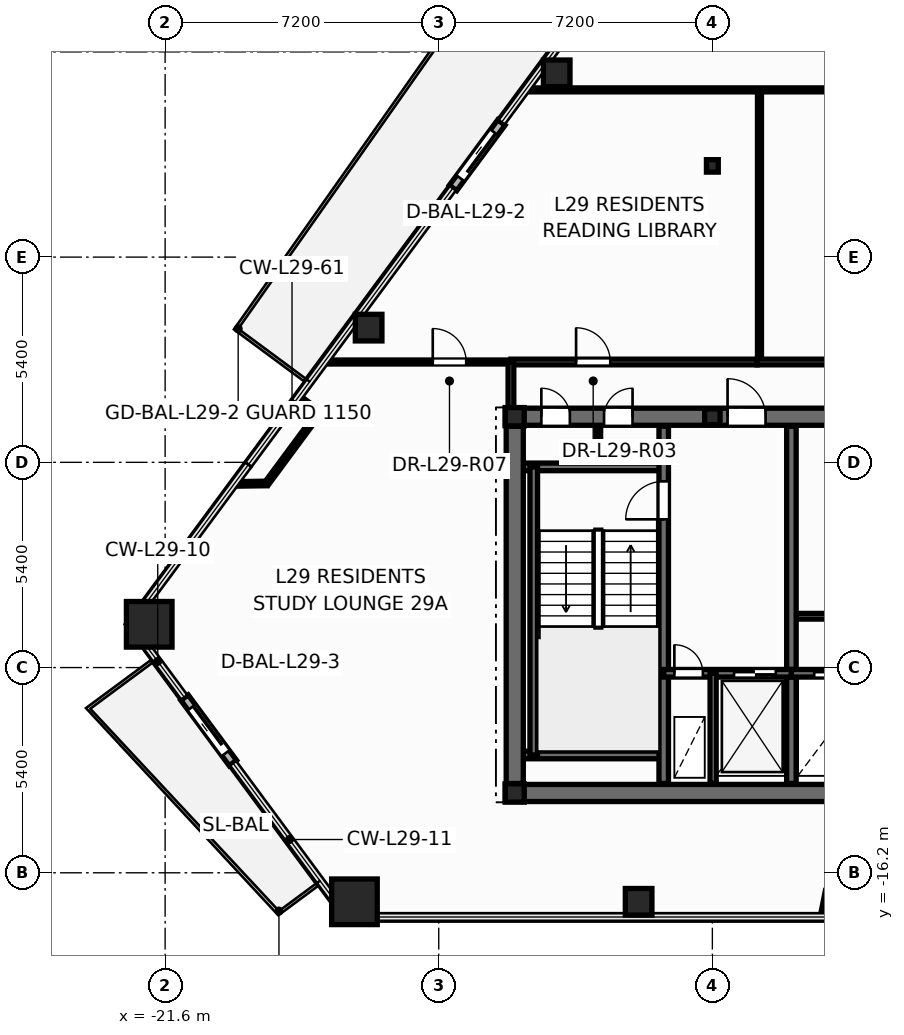
"""IFC4 building model, lengths in metres.
Left out: names, types, materials, properties, quantities, classifications, styles, units other than length and angle.
Written with IfcOpenShell. Run it as: python <this file> out.ifc"""

import sys

from ifc_helpers import new_model, si_unit, direction, frame, frame_2d, origin, origin_2d, place, context, subcontext, project, spatial, rectangle, hollow_rectangle, hollow_circle, i_section, extrude, element, fill, save


model = new_model("IFC4")
c1 = context("Model", 3, precision=1e-05, world=origin(), true_north=direction((0.0, 1.0)))
c2 = subcontext(c1, "Body", "Model", "MODEL_VIEW")
j1 = project(units=[si_unit("LENGTHUNIT", "METRE"), si_unit("PLANEANGLEUNIT", "RADIAN")], contexts=[c1])
p1 = place(None, origin())
s1 = spatial("IfcSite", under=j1, at=p1, CompositionType="ELEMENT")
p2 = place(p1, origin())
s2 = spatial("IfcBuilding", under=s1, at=p2, CompositionType="ELEMENT")
p3 = place(p2, frame((0.0, 0.0, 114.0)))
s3 = spatial("IfcBuildingStorey", under=s2, at=p3, CompositionType="ELEMENT", Elevation=114.0)
for number, where, z_axis, x_axis in (
    (1, (-22.019, -9.662, 0.0), (0.0, 0.0, 1.0), (1.0, 0.0, 0.0)),
    (2, (-16.618, -16.963, 0.0), (0.0, 0.0, 1.0), (1.0, 0.0, 0.0)),
):
    element("IfcColumn", number, at=place(p3, frame(where, z_axis=z_axis, x_axis=x_axis)), inside=s3, PredefinedType="COLUMN", context=c2, shape_type="SweptSolid", body=[
        extrude(hollow_rectangle(XDim=1.2, YDim=1.2, WallThickness=0.055, at=origin_2d()), origin(), (0.0, 0.0, 1.0), 3.6),
    ])
for number, where, z_axis, x_axis in (
    (3, (-9.14, -16.963, 0.0), (0.0, 0.0, 1.0), (1.0, 0.0, 0.0)),
    (4, (-11.296, 4.836, 0.0), (0.0, 0.0, 1.0), (1.0, 0.0, 0.0)),
    (5, (-16.245, -1.856, 0.0), (0.0, 0.0, 1.0), (1.0, 0.0, 0.0)),
):
    element("IfcColumn", number, at=place(p3, frame(where, z_axis=z_axis, x_axis=x_axis)), inside=s3, PredefinedType="COLUMN", context=c2, shape_type="SweptSolid", body=[
        extrude(hollow_circle(Radius=0.35, WallThickness=0.03, at=origin_2d()), origin(), (0.0, 0.0, 1.0), 3.6),
    ])
for number, where, z_axis, x_axis in (
    (6, (-12.4, -14.1, 0.0), (0.0, 0.0, 1.0), (1.0, 0.0, 0.0)),
    (7, (-12.4, -4.2, 0.0), (0.0, 0.0, 1.0), (1.0, 0.0, 0.0)),
):
    element("IfcColumn", number, at=place(p3, frame(where, z_axis=z_axis, x_axis=x_axis)), inside=s3, PredefinedType="COLUMN", context=c2, shape_type="SweptSolid", body=[
        extrude(i_section(OverallWidth=0.5, OverallDepth=0.482, WebThickness=0.04, FlangeThickness=0.045, at=origin_2d()), origin(), (0.0, 0.0, 1.0), 3.6),
    ])
p4 = place(p3, frame((-7.2, -4.2, 0.0), z_axis=(0.0, 0.0, 1.0), x_axis=(1.0, 0.0, 0.0)))
e8 = element("IfcColumn", 8, at=p4, inside=s3, PredefinedType="PILASTER", context=c2, shape_type="SweptSolid", body=[
    extrude(i_section(OverallWidth=0.405, OverallDepth=0.414, WebThickness=0.022, FlangeThickness=0.032, at=origin_2d()), origin(), (0.0, 0.0, 1.0), 3.6),
])
p5 = place(p3, frame((-7.2, 2.4, 0.0), z_axis=(0.0, 0.0, 1.0), x_axis=(1.0, 0.0, 0.0)))
e9 = element("IfcColumn", 9, at=p5, inside=s3, PredefinedType="COLUMN", context=c2, shape_type="SweptSolid", body=[
    extrude(i_section(OverallWidth=0.311, OverallDepth=0.327, WebThickness=0.016, FlangeThickness=0.025, at=origin_2d()), origin(), (0.0, 0.0, 1.0), 3.6),
])
p6 = place(p3, frame((-12.751, 3.541, -0.015), z_axis=(0.0, 0.0, 1.0), x_axis=(-0.594638042479, -0.80399353134, 0.0)))
e10 = element("IfcWall", 10, at=p6, inside=s3, PredefinedType="STANDARD", context=c2, shape_type="SweptSolid", body=[
    extrude(rectangle(XDim=2.14, YDim=0.24, at=frame_2d((1.07, 0.0))), origin(), (0.0, 0.0, 1.0), 2.777),
])
p7 = place(p6, frame((0.32, 0.0, 0.015)))
e11 = element("IfcOpeningElement", 11, at=p7, cuts=e10, PredefinedType="OPENING", context=c2, shape_type="SweptSolid", body=[
    extrude(rectangle(XDim=1.506, YDim=2.204, at=frame_2d((0.75, 1.102))), frame((0.0, 0.13, 0.0), z_axis=(0.0, -1.0, 0.0), x_axis=(1.0, 0.0, 0.0)), (0.0, 0.0, 1.0), 0.26),
])
p8 = place(p3, frame((-21.09, -11.59, -0.015), z_axis=(0.0, 0.0, 1.0), x_axis=(0.594638042479, -0.80399353134, 0.0)))
e12 = element("IfcWall", 12, at=p8, inside=s3, PredefinedType="STANDARD", context=c2, shape_type="SweptSolid", body=[
    extrude(rectangle(XDim=2.14, YDim=0.24, at=frame_2d((1.07, 0.0))), origin(), (0.0, 0.0, 1.0), 2.777),
])
p9 = place(p8, frame((0.32, 0.0, 0.015)))
e13 = element("IfcOpeningElement", 13, at=p9, cuts=e12, PredefinedType="OPENING", context=c2, shape_type="SweptSolid", body=[
    extrude(rectangle(XDim=1.506, YDim=2.204, at=frame_2d((0.75, 1.102))), frame((0.0, 0.13, 0.0), z_axis=(0.0, -1.0, 0.0), x_axis=(1.0, 0.0, 0.0)), (0.0, 0.0, 1.0), 0.26),
])
p10 = place(p3, frame((-5.12, -9.45, 0.0), z_axis=(0.0, 0.0, 1.0), x_axis=(1.0, 0.0, 0.0)))
e14 = element("IfcWall", 14, at=p10, inside=s3, PredefinedType="PARTITIONING", context=c2, shape_type="SweptSolid", body=[
    extrude(rectangle(XDim=3.06, YDim=0.15, at=frame_2d((1.53, 0.0))), origin(), (0.0, 0.0, 1.0), 3.32),
])
p11 = place(p3, frame((-10.2, -5.52, 0.0), z_axis=(0.0, 0.0, 1.0), x_axis=(0.0, 1.0, 0.0)))
e15 = element("IfcWall", 15, at=p11, inside=s3, PredefinedType="PARTITIONING", context=c2, shape_type="SweptSolid", body=[
    extrude(rectangle(XDim=1.12, YDim=0.12, at=frame_2d((0.56, 0.0))), origin(), (0.0, 0.0, 1.0), 3.32),
])
p12 = place(p3, frame((-12.65, -14.1, 0.0), z_axis=(0.0, 0.0, 1.0), x_axis=(1.0, 0.0, 0.0)))
e16 = element("IfcWall", 16, at=p12, inside=s3, PredefinedType="SHEAR", context=c2, shape_type="SweptSolid", body=[
    extrude(rectangle(XDim=25.3, YDim=0.45, at=frame_2d((12.65, 0.0))), origin(), (0.0, 0.0, 1.0), 3.6),
])
p13 = place(p3, frame((-12.65, -4.2, 0.0), z_axis=(0.0, 0.0, 1.0), x_axis=(1.0, 0.0, 0.0)))
e17 = element("IfcWall", 17, at=p13, inside=s3, PredefinedType="SHEAR", context=c2, shape_type="SweptSolid", body=[
    extrude(rectangle(XDim=25.3, YDim=0.45, at=frame_2d((12.65, 0.0))), origin(), (0.0, 0.0, 1.0), 3.6),
])
p14 = place(p13, frame((0.95, 0.0, 0.0)))
e18 = element("IfcOpeningElement", 18, at=p14, cuts=e17, PredefinedType="OPENING", context=c2, shape_type="SweptSolid", body=[
    extrude(rectangle(XDim=0.756, YDim=2.054, at=frame_2d((0.375, 1.027))), frame((0.0, 0.235, 0.0), z_axis=(0.0, -1.0, 0.0), x_axis=(1.0, 0.0, 0.0)), (0.0, 0.0, 1.0), 0.47),
])
p15 = place(p13, frame((2.6, 0.0, 0.0)))
e19 = element("IfcOpeningElement", 19, at=p15, cuts=e17, PredefinedType="OPENING", context=c2, shape_type="SweptSolid", body=[
    extrude(rectangle(XDim=0.756, YDim=2.054, at=frame_2d((0.375, 1.027))), frame((0.0, 0.235, 0.0), z_axis=(0.0, -1.0, 0.0), x_axis=(1.0, 0.0, 0.0)), (0.0, 0.0, 1.0), 0.47),
])
p16 = place(p13, frame((21.85, 0.0, 0.0)))
e20 = element("IfcOpeningElement", 20, at=p16, cuts=e17, PredefinedType="OPENING", context=c2, shape_type="SweptSolid", body=[
    extrude(rectangle(XDim=0.756, YDim=2.054, at=frame_2d((0.375, 1.027))), frame((0.0, 0.235, 0.0), z_axis=(0.0, -1.0, 0.0), x_axis=(1.0, 0.0, 0.0)), (0.0, 0.0, 1.0), 0.47),
])
p17 = place(p13, frame((23.5, 0.0, 0.0)))
e21 = element("IfcOpeningElement", 21, at=p17, cuts=e17, PredefinedType="OPENING", context=c2, shape_type="SweptSolid", body=[
    extrude(rectangle(XDim=0.756, YDim=2.054, at=frame_2d((0.375, 1.027))), frame((0.0, 0.235, 0.0), z_axis=(0.0, -1.0, 0.0), x_axis=(1.0, 0.0, 0.0)), (0.0, 0.0, 1.0), 0.47),
])
p18 = place(p13, frame((5.85, 0.0, 0.0)))
e22 = element("IfcOpeningElement", 22, at=p18, cuts=e17, PredefinedType="OPENING", context=c2, shape_type="SweptSolid", body=[
    extrude(rectangle(XDim=1.006, YDim=2.104, at=frame_2d((0.5, 1.052))), frame((0.0, 0.235, 0.0), z_axis=(0.0, -1.0, 0.0), x_axis=(1.0, 0.0, 0.0)), (0.0, 0.0, 1.0), 0.47),
])
p19 = place(p13, frame((10.35, 0.0, 0.0)))
e23 = element("IfcOpeningElement", 23, at=p19, cuts=e17, PredefinedType="OPENING", context=c2, shape_type="SweptSolid", body=[
    extrude(rectangle(XDim=1.406, YDim=2.154, at=frame_2d((0.7, 1.077))), frame((0.0, 0.235, 0.0), z_axis=(0.0, -1.0, 0.0), x_axis=(1.0, 0.0, 0.0)), (0.0, 0.0, 1.0), 0.47),
])
p20 = place(p13, frame((18.45, 0.0, 0.0)))
e24 = element("IfcOpeningElement", 24, at=p20, cuts=e17, PredefinedType="OPENING", context=c2, shape_type="SweptSolid", body=[
    extrude(rectangle(XDim=1.006, YDim=2.104, at=frame_2d((0.5, 1.052))), frame((0.0, 0.235, 0.0), z_axis=(0.0, -1.0, 0.0), x_axis=(1.0, 0.0, 0.0)), (0.0, 0.0, 1.0), 0.47),
])
for number, where, z_axis, x_axis in (
    (25, (-12.35, -5.52, 0.0), (0.0, 0.0, 1.0), (1.0, 0.0, 0.0)),
    (26, (-12.35, -13.1, 0.0), (0.0, 0.0, 1.0), (1.0, 0.0, 0.0)),
):
    element("IfcWall", number, at=place(p3, frame(where, z_axis=z_axis, x_axis=x_axis)), inside=s3, PredefinedType="SOLIDWALL", context=c2, shape_type="SweptSolid", body=[
        extrude(rectangle(XDim=3.87, YDim=0.2, at=frame_2d((1.935, 0.0))), origin(), (0.0, 0.0, 1.0), 3.6),
    ])
p21 = place(p3, frame((-11.9, -13.1, 0.0), z_axis=(0.0, 0.0, 1.0), x_axis=(0.0, 1.0, 0.0)))
e27 = element("IfcWall", 27, at=p21, inside=s3, PredefinedType="SOLIDWALL", context=c2, shape_type="SweptSolid", body=[
    extrude(rectangle(XDim=7.58, YDim=0.2, at=frame_2d((3.79, 0.0))), origin(), (0.0, 0.0, 1.0), 3.6),
])
p22 = place(p3, frame((-8.48, -13.85, 0.0), z_axis=(0.0, 0.0, 1.0), x_axis=(0.0, 1.0, 0.0)))
e28 = element("IfcWall", 28, at=p22, inside=s3, PredefinedType="SHEAR", context=c2, shape_type="SweptSolid", body=[
    extrude(rectangle(XDim=9.4, YDim=0.25, at=frame_2d((4.7, 0.0))), origin(), (0.0, 0.0, 1.0), 3.6),
])
p23 = place(p22, frame((6.95, 0.0, 0.0)))
e29 = element("IfcOpeningElement", 29, at=p23, cuts=e28, PredefinedType="OPENING", context=c2, shape_type="SweptSolid", body=[
    extrude(rectangle(XDim=1.006, YDim=2.104, at=frame_2d((0.5, 1.052))), frame((0.0, 0.135, 0.0), z_axis=(0.0, -1.0, 0.0), x_axis=(1.0, 0.0, 0.0)), (0.0, 0.0, 1.0), 0.27),
])
p24 = place(p3, frame((-5.12, -13.85, 0.0), z_axis=(0.0, 0.0, 1.0), x_axis=(0.0, 1.0, 0.0)))
e30 = element("IfcWall", 30, at=p24, inside=s3, PredefinedType="SHEAR", context=c2, shape_type="SweptSolid", body=[
    extrude(rectangle(XDim=9.4, YDim=0.25, at=frame_2d((4.7, 0.0))), origin(), (0.0, 0.0, 1.0), 3.6),
])
p25 = place(p3, frame((-8.48, -10.95, 0.0), z_axis=(0.0, 0.0, 1.0), x_axis=(1.0, 0.0, 0.0)))
e31 = element("IfcWall", 31, at=p25, inside=s3, PredefinedType="SOLIDWALL", context=c2, shape_type="SweptSolid", body=[
    extrude(rectangle(XDim=3.36, YDim=0.2, at=frame_2d((1.68, 0.0))), origin(), (0.0, 0.0, 1.0), 3.6),
])
p26 = place(p25, frame((0.28, 0.0, 0.0)))
e32 = element("IfcOpeningElement", 32, at=p26, cuts=e31, PredefinedType="OPENING", context=c2, shape_type="SweptSolid", body=[
    extrude(rectangle(XDim=0.756, YDim=2.054, at=frame_2d((0.375, 1.027))), frame((0.0, 0.11, 0.0), z_axis=(0.0, -1.0, 0.0), x_axis=(1.0, 0.0, 0.0)), (0.0, 0.0, 1.0), 0.22),
])
p27 = place(p25, frame((1.85, 0.0, 0.0)))
e33 = element("IfcOpeningElement", 33, at=p27, cuts=e31, PredefinedType="OPENING", context=c2, shape_type="SweptSolid", body=[
    extrude(rectangle(XDim=1.106, YDim=2.104, at=frame_2d((0.55, 1.052))), frame((0.0, 0.11, 0.0), z_axis=(0.0, -1.0, 0.0), x_axis=(1.0, 0.0, 0.0)), (0.0, 0.0, 1.0), 0.22),
])
p28 = place(p3, frame((-5.12, -10.95, 0.0), z_axis=(0.0, 0.0, 1.0), x_axis=(1.0, 0.0, 0.0)))
e34 = element("IfcWall", 34, at=p28, inside=s3, PredefinedType="SOLIDWALL", context=c2, shape_type="SweptSolid", body=[
    extrude(rectangle(XDim=10.24, YDim=0.2, at=frame_2d((5.12, 0.0))), origin(), (0.0, 0.0, 1.0), 3.6),
])
p29 = place(p28, frame((0.6, 0.0, 0.0)))
e35 = element("IfcOpeningElement", 35, at=p29, cuts=e34, PredefinedType="OPENING", context=c2, shape_type="SweptSolid", body=[
    extrude(rectangle(XDim=1.106, YDim=2.104, at=frame_2d((0.55, 1.052))), frame((0.0, 0.11, 0.0), z_axis=(0.0, -1.0, 0.0), x_axis=(1.0, 0.0, 0.0)), (0.0, 0.0, 1.0), 0.22),
])
p30 = place(p28, frame((2.67, 0.0, 0.0)))
e36 = element("IfcOpeningElement", 36, at=p30, cuts=e34, PredefinedType="OPENING", context=c2, shape_type="SweptSolid", body=[
    extrude(rectangle(XDim=1.106, YDim=2.104, at=frame_2d((0.55, 1.052))), frame((0.0, 0.11, 0.0), z_axis=(0.0, -1.0, 0.0), x_axis=(1.0, 0.0, 0.0)), (0.0, 0.0, 1.0), 0.22),
])
p31 = place(p28, frame((4.57, 0.0, 0.0)))
e37 = element("IfcOpeningElement", 37, at=p31, cuts=e34, PredefinedType="OPENING", context=c2, shape_type="SweptSolid", body=[
    extrude(rectangle(XDim=1.106, YDim=2.104, at=frame_2d((0.55, 1.052))), frame((0.0, 0.11, 0.0), z_axis=(0.0, -1.0, 0.0), x_axis=(1.0, 0.0, 0.0)), (0.0, 0.0, 1.0), 0.22),
])
p32 = place(p28, frame((6.47, 0.0, 0.0)))
e38 = element("IfcOpeningElement", 38, at=p32, cuts=e34, PredefinedType="OPENING", context=c2, shape_type="SweptSolid", body=[
    extrude(rectangle(XDim=1.106, YDim=2.104, at=frame_2d((0.55, 1.052))), frame((0.0, 0.11, 0.0), z_axis=(0.0, -1.0, 0.0), x_axis=(1.0, 0.0, 0.0)), (0.0, 0.0, 1.0), 0.22),
])
p33 = place(p28, frame((8.54, 0.0, 0.0)))
e39 = element("IfcOpeningElement", 39, at=p33, cuts=e34, PredefinedType="OPENING", context=c2, shape_type="SweptSolid", body=[
    extrude(rectangle(XDim=1.106, YDim=2.104, at=frame_2d((0.55, 1.052))), frame((0.0, 0.11, 0.0), z_axis=(0.0, -1.0, 0.0), x_axis=(1.0, 0.0, 0.0)), (0.0, 0.0, 1.0), 0.22),
])
p34 = place(p3, frame((-7.18, -13.85, 0.0), z_axis=(0.0, 0.0, 1.0), x_axis=(0.0, 1.0, 0.0)))
e40 = element("IfcWall", 40, at=p34, inside=s3, PredefinedType="PARTITIONING", context=c2, shape_type="SweptSolid", body=[
    extrude(rectangle(XDim=2.9, YDim=0.16, at=frame_2d((1.45, 0.0))), origin(), (0.0, 0.0, 1.0), 2.345),
])
p35 = place(p3, frame((-12.4, -13.85, 0.0), z_axis=(0.0, 0.0, 1.0), x_axis=(0.0, 1.0, 0.0)))
e41 = element("IfcWall", 41, at=p35, inside=s3, PredefinedType="SHEAR", context=c2, shape_type="SweptSolid", body=[
    extrude(rectangle(XDim=9.4, YDim=0.45, at=frame_2d((4.7, 0.0))), origin(), (0.0, 0.0, 1.0), 3.6),
])
p36 = place(p3, frame((-5.96, -2.76, 0.0), z_axis=(0.0, 0.0, 1.0), x_axis=(0.0, 1.0, 0.0)))
e42 = element("IfcWall", 42, at=p36, inside=s3, PredefinedType="PARTITIONING", context=c2, shape_type="SweptSolid", body=[
    extrude(rectangle(XDim=7.16, YDim=0.105, at=frame_2d((3.58, 0.0))), origin(), (0.0, 0.0, 1.0), 2.295),
])
p37 = place(p3, frame((-6.02, -2.76, 0.0), z_axis=(0.0, 0.0, 1.0), x_axis=(1.0, 0.0, 0.0)))
e43 = element("IfcWall", 43, at=p37, inside=s3, PredefinedType="PARTITIONING", context=c2, shape_type="SweptSolid", body=[
    extrude(rectangle(XDim=6.66, YDim=0.15, at=frame_2d((3.33, 0.0))), origin(), (0.0, 0.0, 1.0), 2.295),
])
p38 = place(p3, frame((-12.116, 4.4, 0.0), z_axis=(0.0, 0.0, 1.0), x_axis=(1.0, 0.0, 0.0)))
e44 = element("IfcWall", 44, at=p38, inside=s3, PredefinedType="PARTITIONING", context=c2, shape_type="SweptSolid", body=[
    extrude(rectangle(XDim=12.756, YDim=0.105, at=frame_2d((6.378, 0.0))), origin(), (0.0, 0.0, 1.0), 2.295),
])
p39 = place(p3, frame((-12.5, -2.76, 0.0), z_axis=(0.0, 0.0, 1.0), x_axis=(1.0, 0.0, 0.0)))
e45 = element("IfcWall", 45, at=p39, inside=s3, PredefinedType="PARTITIONING", context=c2, shape_type="SweptSolid", body=[
    extrude(rectangle(XDim=6.478, YDim=0.15, at=frame_2d((3.239, 0.0))), origin(), (0.0, 0.0, 1.0), 2.295),
])
p40 = place(p39, frame((1.714, 0.0, 0.0)))
e46 = element("IfcOpeningElement", 46, at=p40, cuts=e45, PredefinedType="OPENING", context=c2, shape_type="SweptSolid", body=[
    extrude(rectangle(XDim=0.906, YDim=2.104, at=frame_2d((0.45, 1.052))), frame((0.0, 0.085, 0.0), z_axis=(0.0, -1.0, 0.0), x_axis=(1.0, 0.0, 0.0)), (0.0, 0.0, 1.0), 0.17),
])
p41 = place(p3, frame((-17.411, -2.76, 0.0), z_axis=(0.0, 0.0, 1.0), x_axis=(1.0, 0.0, 0.0)))
e47 = element("IfcWall", 47, at=p41, inside=s3, PredefinedType="PARTITIONING", context=c2, shape_type="SweptSolid", body=[
    extrude(rectangle(XDim=4.971, YDim=0.105, at=frame_2d((2.486, 0.0))), origin(), (0.0, 0.0, 1.0), 2.762),
])
p42 = place(p41, frame((2.854, 0.0, 0.0)))
e48 = element("IfcOpeningElement", 48, at=p42, cuts=e47, PredefinedType="OPENING", context=c2, shape_type="SweptSolid", body=[
    extrude(rectangle(XDim=0.886, YDim=2.104, at=frame_2d((0.44, 1.052))), frame((0.0, 0.062, 0.0), z_axis=(0.0, -1.0, 0.0), x_axis=(1.0, 0.0, 0.0)), (0.0, 0.0, 1.0), 0.125),
])
p43 = place(p3, frame((-17.548, -4.089, 0.0), z_axis=(0.0, 0.0, 1.0), x_axis=(-0.594707185977, -0.803942387829, 0.0)))
e49 = element("IfcWall", 49, at=p43, inside=s3, PredefinedType="PARTITIONING", context=c2, shape_type="SweptSolid", body=[
    extrude(rectangle(XDim=2.323, YDim=0.12, at=frame_2d((1.162, 0.0))), origin(), (0.0, 0.0, 1.0), 3.32),
])
p44 = place(p3, frame((-12.5, -4.24, 0.0), z_axis=(0.0, 0.0, 1.0), x_axis=(0.0, 1.0, 0.0)))
e50 = element("IfcWall", 50, at=p44, inside=s3, PredefinedType="PARTITIONING", context=c2, shape_type="SweptSolid", body=[
    extrude(rectangle(XDim=1.48, YDim=0.15, at=frame_2d((0.74, 0.0))), origin(), (0.0, 0.0, 1.0), 2.295),
])
p45 = place(p3, frame((-18.93, -5.956, 0.0), z_axis=(0.0, 0.0, 1.0), x_axis=(-0.999903115379, -0.013919764947, 0.0)))
e51 = element("IfcWall", 51, at=p45, inside=s3, PredefinedType="PARTITIONING", context=c2, shape_type="SweptSolid", body=[
    extrude(rectangle(XDim=0.842, YDim=0.12, at=frame_2d((0.421, 0.0))), origin(), (0.0, 0.0, 1.0), 2.762),
])
p46 = place(p3, frame((-4.301, -17.353, 0.0), z_axis=(0.0, 0.0, 1.0), x_axis=(0.195153744134, 0.980772662828, 0.0)))
e52 = element("IfcWall", 52, at=p46, inside=s3, PredefinedType="PARTITIONING", context=c2, shape_type="SweptSolid", body=[
    extrude(rectangle(XDim=0.683, YDim=0.12, at=frame_2d((0.342, 0.0))), origin(), (0.0, 0.0, 1.0), 2.762),
])
p47 = place(p3, frame((-18.087, -3.69, 0.0), z_axis=(0.0, 0.0, 1.0), x_axis=(0.804047409182, -0.594565188847, 0.0)))
e53 = element("IfcWall", 53, at=p47, inside=s3, PredefinedType="PARTITIONING", context=c2, shape_type="SweptSolid", body=[
    extrude(rectangle(XDim=0.67, YDim=0.12, at=frame_2d((0.335, 0.0))), origin(), (0.0, 0.0, 1.0), 2.762),
])
p48 = place(p7, origin())
e54 = element("IfcDoor", 54, at=p48, inside=s3, OperationType="SLIDING_TO_RIGHT", PredefinedType="DOOR", context=c2, shape_type="SweptSolid", body=[
    extrude(rectangle(XDim=1.5, YDim=2.2, at=frame_2d((0.75, 1.1))), frame((0.0, 0.025, 0.0), z_axis=(0.0, -1.0, 0.0), x_axis=(1.0, 0.0, 0.0)), (0.0, 0.0, 1.0), 0.05),
])
fill(e11, e54)
p49 = place(p9, origin())
e55 = element("IfcDoor", 55, at=p49, inside=s3, OperationType="SLIDING_TO_RIGHT", PredefinedType="DOOR", context=c2, shape_type="SweptSolid", body=[
    extrude(rectangle(XDim=1.5, YDim=2.2, at=frame_2d((0.75, 1.1))), frame((0.0, 0.025, 0.0), z_axis=(0.0, -1.0, 0.0), x_axis=(1.0, 0.0, 0.0)), (0.0, 0.0, 1.0), 0.05),
])
fill(e13, e55)
p50 = place(p23, origin())
e56 = element("IfcDoor", 56, at=p50, inside=s3, OperationType="SINGLE_SWING_LEFT", PredefinedType="DOOR", context=c2, shape_type="SweptSolid", body=[
    extrude(rectangle(XDim=1.0, YDim=2.1, at=frame_2d((0.5, 1.05))), frame((0.0, 0.025, 0.0), z_axis=(0.0, -1.0, 0.0), x_axis=(1.0, 0.0, 0.0)), (0.0, 0.0, 1.0), 0.05),
])
fill(e29, e56)
p51 = place(p26, origin())
e57 = element("IfcDoor", 57, at=p51, inside=s3, OperationType="SINGLE_SWING_LEFT", PredefinedType="DOOR", context=c2, shape_type="SweptSolid", body=[
    extrude(rectangle(XDim=0.75, YDim=2.05, at=frame_2d((0.375, 1.025))), frame((0.0, 0.025, 0.0), z_axis=(0.0, -1.0, 0.0), x_axis=(1.0, 0.0, 0.0)), (0.0, 0.0, 1.0), 0.05),
])
fill(e32, e57)
p52 = place(p27, origin())
e58 = element("IfcDoor", 58, at=p52, inside=s3, OperationType="DOUBLE_DOOR_SLIDING", PredefinedType="DOOR", context=c2, shape_type="SweptSolid", body=[
    extrude(rectangle(XDim=1.1, YDim=2.1, at=frame_2d((0.55, 1.05))), frame((0.0, 0.025, 0.0), z_axis=(0.0, -1.0, 0.0), x_axis=(1.0, 0.0, 0.0)), (0.0, 0.0, 1.0), 0.05),
])
fill(e33, e58)
p53 = place(p29, origin())
e59 = element("IfcDoor", 59, at=p53, inside=s3, OperationType="DOUBLE_DOOR_SLIDING", PredefinedType="DOOR", context=c2, shape_type="SweptSolid", body=[
    extrude(rectangle(XDim=1.1, YDim=2.1, at=frame_2d((0.55, 1.05))), frame((0.0, 0.025, 0.0), z_axis=(0.0, -1.0, 0.0), x_axis=(1.0, 0.0, 0.0)), (0.0, 0.0, 1.0), 0.05),
])
fill(e35, e59)
p54 = place(p14, origin())
e60 = element("IfcDoor", 60, at=p54, inside=s3, OperationType="SINGLE_SWING_LEFT", PredefinedType="DOOR", context=c2, shape_type="SweptSolid", body=[
    extrude(rectangle(XDim=0.75, YDim=2.05, at=frame_2d((0.375, 1.025))), frame((0.0, 0.025, 0.0), z_axis=(0.0, -1.0, 0.0), x_axis=(1.0, 0.0, 0.0)), (0.0, 0.0, 1.0), 0.05),
])
fill(e18, e60)
p55 = place(p15, origin())
e61 = element("IfcDoor", 61, at=p55, inside=s3, OperationType="SINGLE_SWING_RIGHT", PredefinedType="DOOR", context=c2, shape_type="SweptSolid", body=[
    extrude(rectangle(XDim=0.75, YDim=2.05, at=frame_2d((0.375, 1.025))), frame((0.0, 0.025, 0.0), z_axis=(0.0, -1.0, 0.0), x_axis=(1.0, 0.0, 0.0)), (0.0, 0.0, 1.0), 0.05),
])
fill(e19, e61)
p56 = place(p18, origin())
e62 = element("IfcDoor", 62, at=p56, inside=s3, OperationType="SINGLE_SWING_LEFT", PredefinedType="DOOR", context=c2, shape_type="SweptSolid", body=[
    extrude(rectangle(XDim=1.0, YDim=2.1, at=frame_2d((0.5, 1.05))), frame((0.0, 0.025, 0.0), z_axis=(0.0, -1.0, 0.0), x_axis=(1.0, 0.0, 0.0)), (0.0, 0.0, 1.0), 0.05),
])
fill(e22, e62)
p57 = place(p40, origin())
e63 = element("IfcDoor", 63, at=p57, inside=s3, OperationType="SINGLE_SWING_LEFT", PredefinedType="DOOR", context=c2, shape_type="SweptSolid", body=[
    extrude(rectangle(XDim=0.9, YDim=2.1, at=frame_2d((0.45, 1.05))), frame((0.0, 0.025, 0.0), z_axis=(0.0, -1.0, 0.0), x_axis=(1.0, 0.0, 0.0)), (0.0, 0.0, 1.0), 0.05),
])
fill(e46, e63)
p58 = place(p42, origin())
e64 = element("IfcDoor", 64, at=p58, inside=s3, OperationType="SINGLE_SWING_LEFT", PredefinedType="DOOR", context=c2, shape_type="SweptSolid", body=[
    extrude(rectangle(XDim=0.88, YDim=2.1, at=frame_2d((0.44, 1.05))), frame((0.0, 0.025, 0.0), z_axis=(0.0, -1.0, 0.0), x_axis=(1.0, 0.0, 0.0)), (0.0, 0.0, 1.0), 0.05),
])
fill(e48, e64)
save(model, sys.argv[1])
